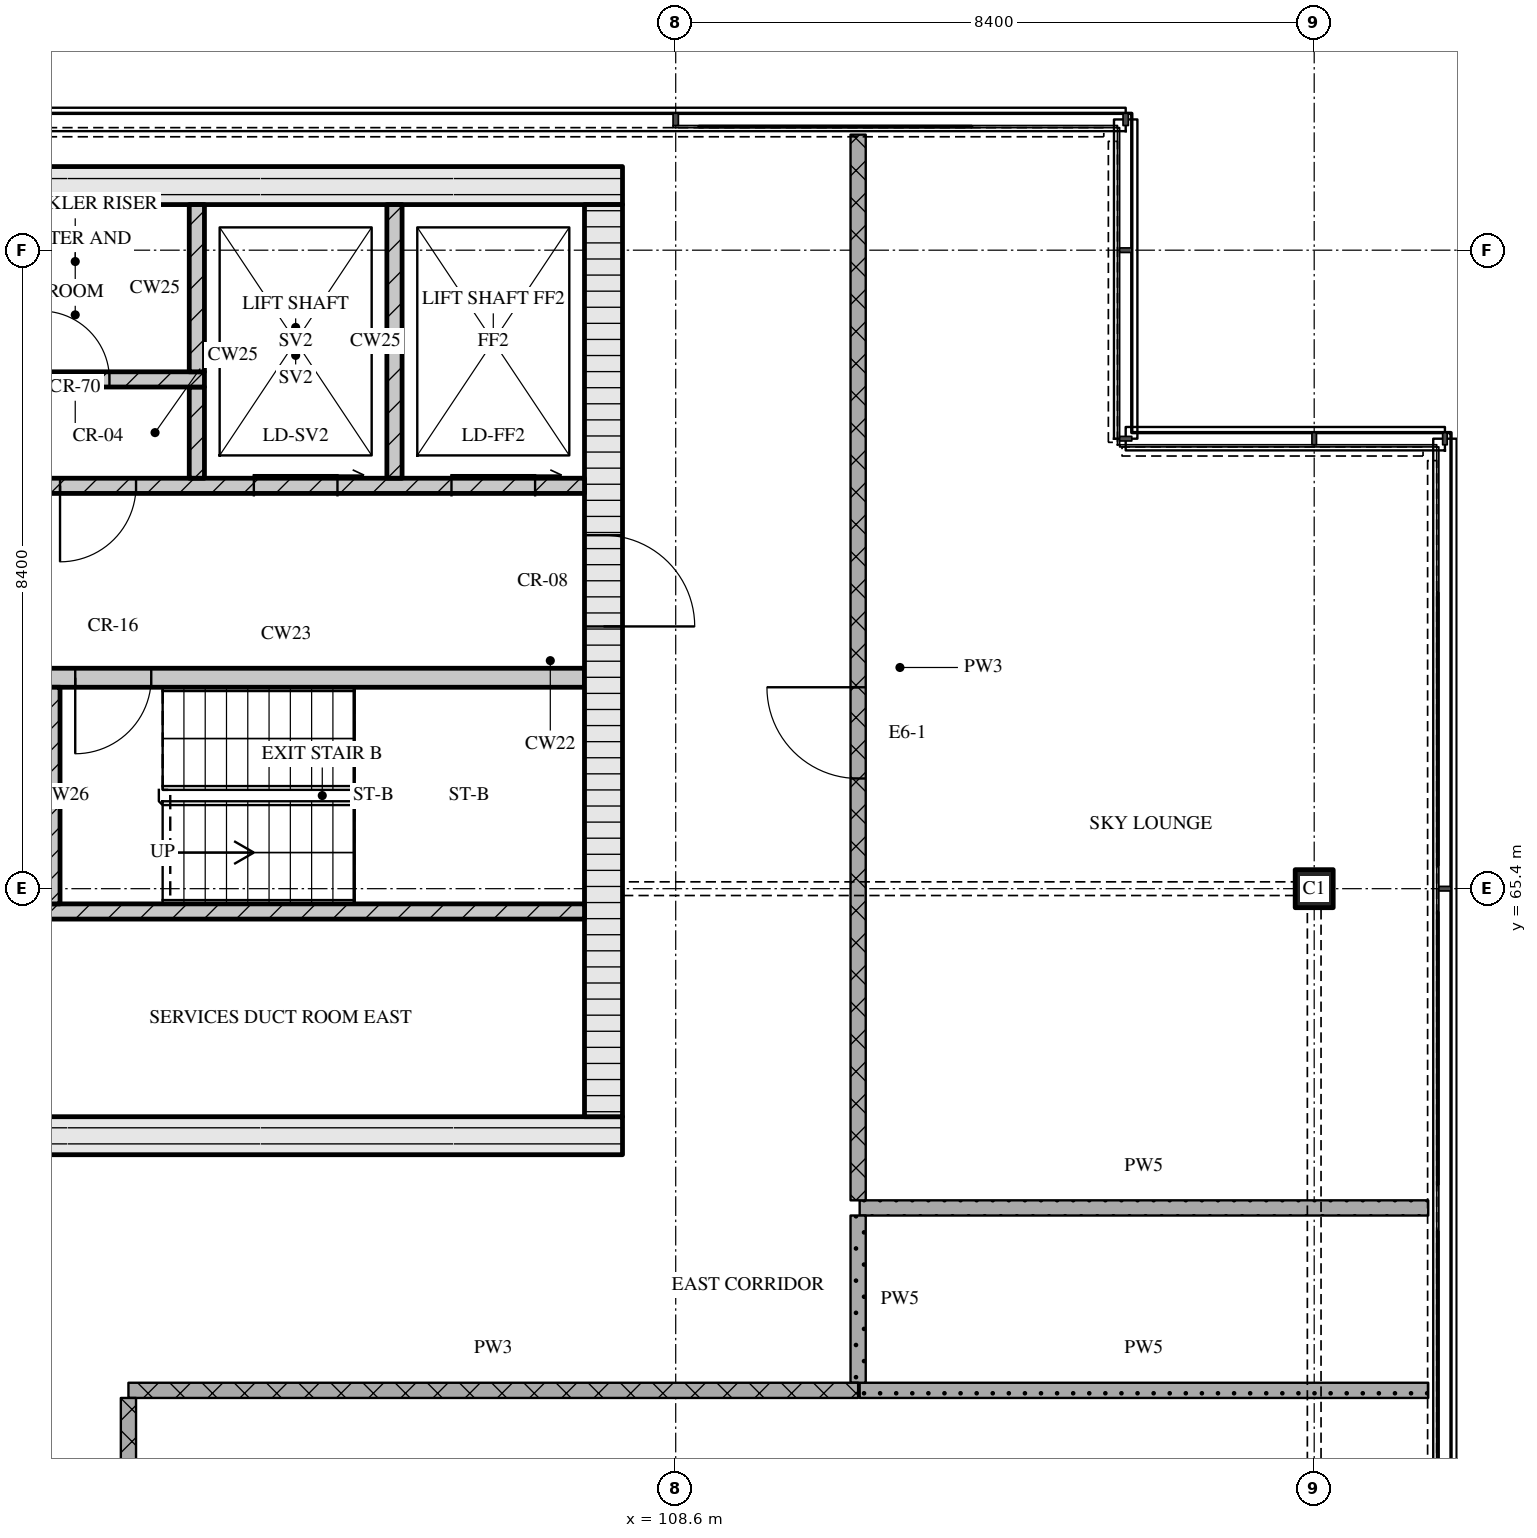
"""IFC4 building model, lengths in metres.
Left out: names, types, materials, properties, quantities, classifications, styles, units other than length and angle.
Written with IfcOpenShell. Run it as: python <this file> out.ifc"""

import sys

from ifc_helpers import new_model, si_unit, direction, frame, frame_2d, origin, origin_2d, place, context, subcontext, project, spatial, rectangle, extrude, element, fill, save


model = new_model("IFC4")
c1 = context("Model", 3, precision=1e-05, world=origin(), true_north=direction((0.0, 1.0)))
c2 = subcontext(c1, "Body", "Model", "MODEL_VIEW")
j1 = project(units=[si_unit("LENGTHUNIT", "METRE"), si_unit("PLANEANGLEUNIT", "RADIAN")], contexts=[c1])
p1 = place(None, origin())
s1 = spatial("IfcSite", under=j1, at=p1, CompositionType="ELEMENT")
p2 = place(p1, origin())
s2 = spatial("IfcBuilding", under=s1, at=p2, CompositionType="ELEMENT")
p3 = place(p2, frame((0.0, 0.0, 299.55)))
s3 = spatial("IfcBuildingStorey", under=s2, at=p3, CompositionType="ELEMENT", Elevation=299.55)
p4 = place(p3, frame((117.0, 65.4, 0.0), z_axis=(0.0, 0.0, 1.0), x_axis=(1.0, 0.0, 0.0)))
e1 = element("IfcColumn", 1, at=p4, inside=s3, PredefinedType="COLUMN", context=c2, shape_type="SweptSolid", body=[
    extrude(rectangle(XDim=0.5, YDim=0.5, at=origin_2d()), origin(), (0.0, 0.0, 1.0), 3.6),
])
p5 = place(p3, frame((67.3, 62.15, 0.0), z_axis=(0.0, 0.0, 1.0), x_axis=(1.0, 0.0, 0.0)))
e2 = element("IfcWall", 2, at=p5, inside=s3, PredefinedType="SOLIDWALL", context=c2, shape_type="SweptSolid", body=[
    extrude(rectangle(XDim=40.6, YDim=0.5, at=frame_2d((20.3, 0.0))), origin(), (0.0, 0.0, 1.0), 3.32),
])
p6 = place(p5, frame((20.65, 0.0, 0.0)))
e3 = element("IfcOpeningElement", 3, at=p6, cuts=e2, PredefinedType="OPENING", context=c2, shape_type="SweptSolid", body=[
    extrude(rectangle(XDim=1.8, YDim=2.1, at=frame_2d((0.9, 1.05))), frame((0.0, 0.26, 0.0), z_axis=(0.0, -1.0, 0.0), x_axis=(1.0, 0.0, 0.0)), (0.0, 0.0, 1.0), 0.52),
])
p7 = place(p3, frame((67.3, 74.65, 0.0), z_axis=(0.0, 0.0, 1.0), x_axis=(1.0, 0.0, 0.0)))
e4 = element("IfcWall", 4, at=p7, inside=s3, PredefinedType="SOLIDWALL", context=c2, shape_type="SweptSolid", body=[
    extrude(rectangle(XDim=40.6, YDim=0.5, at=frame_2d((20.3, 0.0))), origin(), (0.0, 0.0, 1.0), 3.32),
])
p8 = place(p3, frame((107.65, 62.4, 0.0), z_axis=(0.0, 0.0, 1.0), x_axis=(0.0, 1.0, 0.0)))
e5 = element("IfcWall", 5, at=p8, inside=s3, PredefinedType="SOLIDWALL", context=c2, shape_type="SweptSolid", body=[
    extrude(rectangle(XDim=12.0, YDim=0.5, at=frame_2d((6.0, 0.0))), origin(), (0.0, 0.0, 1.0), 3.32),
])
p9 = place(p8, frame((6.45, 0.0, 0.0)))
e6 = element("IfcOpeningElement", 6, at=p9, cuts=e5, PredefinedType="OPENING", context=c2, shape_type="SweptSolid", body=[
    extrude(rectangle(XDim=1.2, YDim=2.1, at=frame_2d((0.6, 1.05))), frame((0.0, 0.26, 0.0), z_axis=(0.0, -1.0, 0.0), x_axis=(1.0, 0.0, 0.0)), (0.0, 0.0, 1.0), 0.52),
])
p10 = place(p3, frame((91.4, 65.1, 0.0), z_axis=(0.0, 0.0, 1.0), x_axis=(1.0, 0.0, 0.0)))
e7 = element("IfcWall", 7, at=p10, inside=s3, PredefinedType="SOLIDWALL", context=c2, shape_type="SweptSolid", body=[
    extrude(rectangle(XDim=16.0, YDim=0.2, at=frame_2d((8.0, 0.0))), origin(), (0.0, 0.0, 1.0), 3.32),
])
p11 = place(p10, frame((0.85, 0.0, 0.0)))
e8 = element("IfcOpeningElement", 8, at=p11, cuts=e7, PredefinedType="OPENING", context=c2, shape_type="SweptSolid", body=[
    extrude(rectangle(XDim=1.1, YDim=2.1, at=frame_2d((0.55, 1.05))), frame((0.0, 0.11, 0.0), z_axis=(0.0, -1.0, 0.0), x_axis=(1.0, 0.0, 0.0)), (0.0, 0.0, 1.0), 0.22),
])
p12 = place(p10, frame((3.35, 0.0, 0.0)))
e9 = element("IfcOpeningElement", 9, at=p12, cuts=e7, PredefinedType="OPENING", context=c2, shape_type="SweptSolid", body=[
    extrude(rectangle(XDim=1.1, YDim=2.1, at=frame_2d((0.55, 1.05))), frame((0.0, 0.11, 0.0), z_axis=(0.0, -1.0, 0.0), x_axis=(1.0, 0.0, 0.0)), (0.0, 0.0, 1.0), 0.22),
])
p13 = place(p10, frame((5.85, 0.0, 0.0)))
e10 = element("IfcOpeningElement", 10, at=p13, cuts=e7, PredefinedType="OPENING", context=c2, shape_type="SweptSolid", body=[
    extrude(rectangle(XDim=1.1, YDim=2.1, at=frame_2d((0.55, 1.05))), frame((0.0, 0.11, 0.0), z_axis=(0.0, -1.0, 0.0), x_axis=(1.0, 0.0, 0.0)), (0.0, 0.0, 1.0), 0.22),
])
p14 = place(p10, frame((7.83, 0.0, 0.0)))
e11 = element("IfcOpeningElement", 11, at=p14, cuts=e7, PredefinedType="OPENING", context=c2, shape_type="SweptSolid", body=[
    extrude(rectangle(XDim=0.9, YDim=2.1, at=frame_2d((0.45, 1.05))), frame((0.0, 0.11, 0.0), z_axis=(0.0, -1.0, 0.0), x_axis=(1.0, 0.0, 0.0)), (0.0, 0.0, 1.0), 0.22),
])
p15 = place(p3, frame((100.35, 65.2, 0.0), z_axis=(0.0, 0.0, 1.0), x_axis=(0.0, 1.0, 0.0)))
e12 = element("IfcWall", 12, at=p15, inside=s3, PredefinedType="SOLIDWALL", context=c2, shape_type="SweptSolid", body=[
    extrude(rectangle(XDim=2.85, YDim=0.3, at=frame_2d((1.425, 0.0))), origin(), (0.0, 0.0, 1.0), 3.32),
])
p16 = place(p3, frame((98.95, 68.175, 0.0), z_axis=(0.0, 0.0, 1.0), x_axis=(1.0, 0.0, 0.0)))
e13 = element("IfcWall", 13, at=p16, inside=s3, PredefinedType="SOLIDWALL", context=c2, shape_type="SweptSolid", body=[
    extrude(rectangle(XDim=8.45, YDim=0.25, at=frame_2d((4.225, 0.0))), origin(), (0.0, 0.0, 1.0), 3.32),
])
p17 = place(p16, frame((0.45, 0.0, 0.0)))
e14 = element("IfcOpeningElement", 14, at=p17, cuts=e13, PredefinedType="OPENING", context=c2, shape_type="SweptSolid", body=[
    extrude(rectangle(XDim=0.8, YDim=2.1, at=frame_2d((0.4, 1.05))), frame((0.0, 0.135, 0.0), z_axis=(0.0, -1.0, 0.0), x_axis=(1.0, 0.0, 0.0)), (0.0, 0.0, 1.0), 0.27),
])
p18 = place(p16, frame((1.75, 0.0, 0.0)))
e15 = element("IfcOpeningElement", 15, at=p18, cuts=e13, PredefinedType="OPENING", context=c2, shape_type="SweptSolid", body=[
    extrude(rectangle(XDim=1.0, YDim=2.1, at=frame_2d((0.5, 1.05))), frame((0.0, 0.135, 0.0), z_axis=(0.0, -1.0, 0.0), x_axis=(1.0, 0.0, 0.0)), (0.0, 0.0, 1.0), 0.27),
])
p19 = place(p3, frame((67.8, 70.7, 0.0), z_axis=(0.0, 0.0, 1.0), x_axis=(1.0, 0.0, 0.0)))
e16 = element("IfcWall", 16, at=p19, inside=s3, PredefinedType="SOLIDWALL", context=c2, shape_type="SweptSolid", body=[
    extrude(rectangle(XDim=39.6, YDim=0.2, at=frame_2d((19.8, 0.0))), origin(), (0.0, 0.0, 1.0), 3.32),
])
p20 = place(p19, frame((0.65, 0.0, 0.0)))
e17 = element("IfcOpeningElement", 17, at=p20, cuts=e16, PredefinedType="OPENING", context=c2, shape_type="SweptSolid", body=[
    extrude(rectangle(XDim=1.1, YDim=2.1, at=frame_2d((0.55, 1.05))), frame((0.0, 0.11, 0.0), z_axis=(0.0, -1.0, 0.0), x_axis=(1.0, 0.0, 0.0)), (0.0, 0.0, 1.0), 0.22),
])
p21 = place(p19, frame((3.25, 0.0, 0.0)))
e18 = element("IfcOpeningElement", 18, at=p21, cuts=e16, PredefinedType="OPENING", context=c2, shape_type="SweptSolid", body=[
    extrude(rectangle(XDim=1.1, YDim=2.1, at=frame_2d((0.55, 1.05))), frame((0.0, 0.11, 0.0), z_axis=(0.0, -1.0, 0.0), x_axis=(1.0, 0.0, 0.0)), (0.0, 0.0, 1.0), 0.22),
])
p22 = place(p19, frame((5.9, 0.0, 0.0)))
e19 = element("IfcOpeningElement", 19, at=p22, cuts=e16, PredefinedType="OPENING", context=c2, shape_type="SweptSolid", body=[
    extrude(rectangle(XDim=1.0, YDim=2.1, at=frame_2d((0.5, 1.05))), frame((0.0, 0.11, 0.0), z_axis=(0.0, -1.0, 0.0), x_axis=(1.0, 0.0, 0.0)), (0.0, 0.0, 1.0), 0.22),
])
p23 = place(p19, frame((21.7, 0.0, 0.0)))
e20 = element("IfcOpeningElement", 20, at=p23, cuts=e16, PredefinedType="OPENING", context=c2, shape_type="SweptSolid", body=[
    extrude(rectangle(XDim=1.0, YDim=2.1, at=frame_2d((0.5, 1.05))), frame((0.0, 0.11, 0.0), z_axis=(0.0, -1.0, 0.0), x_axis=(1.0, 0.0, 0.0)), (0.0, 0.0, 1.0), 0.22),
])
p24 = place(p19, frame((32.7, 0.0, 0.0)))
e21 = element("IfcOpeningElement", 21, at=p24, cuts=e16, PredefinedType="OPENING", context=c2, shape_type="SweptSolid", body=[
    extrude(rectangle(XDim=1.0, YDim=2.1, at=frame_2d((0.5, 1.05))), frame((0.0, 0.11, 0.0), z_axis=(0.0, -1.0, 0.0), x_axis=(1.0, 0.0, 0.0)), (0.0, 0.0, 1.0), 0.22),
])
p25 = place(p19, frame((35.25, 0.0, 0.0)))
e22 = element("IfcOpeningElement", 22, at=p25, cuts=e16, PredefinedType="OPENING", context=c2, shape_type="SweptSolid", body=[
    extrude(rectangle(XDim=1.1, YDim=2.1, at=frame_2d((0.55, 1.05))), frame((0.0, 0.11, 0.0), z_axis=(0.0, -1.0, 0.0), x_axis=(1.0, 0.0, 0.0)), (0.0, 0.0, 1.0), 0.22),
])
p26 = place(p19, frame((37.85, 0.0, 0.0)))
e23 = element("IfcOpeningElement", 23, at=p26, cuts=e16, PredefinedType="OPENING", context=c2, shape_type="SweptSolid", body=[
    extrude(rectangle(XDim=1.1, YDim=2.1, at=frame_2d((0.55, 1.05))), frame((0.0, 0.11, 0.0), z_axis=(0.0, -1.0, 0.0), x_axis=(1.0, 0.0, 0.0)), (0.0, 0.0, 1.0), 0.22),
])
p27 = place(p3, frame((102.3, 70.8, 0.0), z_axis=(0.0, 0.0, 1.0), x_axis=(0.0, 1.0, 0.0)))
e24 = element("IfcWall", 24, at=p27, inside=s3, PredefinedType="SOLIDWALL", context=c2, shape_type="SweptSolid", body=[
    extrude(rectangle(XDim=1.2, YDim=0.2, at=frame_2d((0.6, 0.0))), origin(), (0.0, 0.0, 1.0), 3.32),
])
p28 = place(p3, frame((104.9, 70.8, 0.0), z_axis=(0.0, 0.0, 1.0), x_axis=(0.0, 1.0, 0.0)))
e25 = element("IfcWall", 25, at=p28, inside=s3, PredefinedType="SOLIDWALL", context=c2, shape_type="SweptSolid", body=[
    extrude(rectangle(XDim=3.6, YDim=0.2, at=frame_2d((1.8, 0.0))), origin(), (0.0, 0.0, 1.0), 3.32),
])
p29 = place(p3, frame((93.28, 72.1, 0.0), z_axis=(0.0, 0.0, 1.0), x_axis=(1.0, 0.0, 0.0)))
e26 = element("IfcWall", 26, at=p29, inside=s3, PredefinedType="SOLIDWALL", context=c2, shape_type="SweptSolid", body=[
    extrude(rectangle(XDim=9.12, YDim=0.2, at=frame_2d((4.56, 0.0))), origin(), (0.0, 0.0, 1.0), 3.32),
])
p30 = place(p29, frame((0.87, 0.0, 0.0)))
e27 = element("IfcOpeningElement", 27, at=p30, cuts=e26, PredefinedType="OPENING", context=c2, shape_type="SweptSolid", body=[
    extrude(rectangle(XDim=0.9, YDim=2.1, at=frame_2d((0.45, 1.05))), frame((0.0, 0.11, 0.0), z_axis=(0.0, -1.0, 0.0), x_axis=(1.0, 0.0, 0.0)), (0.0, 0.0, 1.0), 0.22),
])
p31 = place(p29, frame((3.73, 0.0, 0.0)))
e28 = element("IfcOpeningElement", 28, at=p31, cuts=e26, PredefinedType="OPENING", context=c2, shape_type="SweptSolid", body=[
    extrude(rectangle(XDim=0.9, YDim=2.1, at=frame_2d((0.45, 1.05))), frame((0.0, 0.11, 0.0), z_axis=(0.0, -1.0, 0.0), x_axis=(1.0, 0.0, 0.0)), (0.0, 0.0, 1.0), 0.22),
])
p32 = place(p29, frame((6.97, 0.0, 0.0)))
e29 = element("IfcOpeningElement", 29, at=p32, cuts=e26, PredefinedType="OPENING", context=c2, shape_type="SweptSolid", body=[
    extrude(rectangle(XDim=0.9, YDim=2.1, at=frame_2d((0.45, 1.05))), frame((0.0, 0.11, 0.0), z_axis=(0.0, -1.0, 0.0), x_axis=(1.0, 0.0, 0.0)), (0.0, 0.0, 1.0), 0.22),
])
p33 = place(p3, frame((102.3, 72.2, 0.0), z_axis=(0.0, 0.0, 1.0), x_axis=(0.0, 1.0, 0.0)))
e30 = element("IfcWall", 30, at=p33, inside=s3, PredefinedType="SOLIDWALL", context=c2, shape_type="SweptSolid", body=[
    extrude(rectangle(XDim=2.2, YDim=0.2, at=frame_2d((1.1, 0.0))), origin(), (0.0, 0.0, 1.0), 3.32),
])
p34 = place(p3, frame((101.4, 58.8, 0.0), z_axis=(0.0, 0.0, 1.0), x_axis=(1.0, 0.0, 0.0)))
e31 = element("IfcWall", 31, at=p34, inside=s3, PredefinedType="PARTITIONING", context=c2, shape_type="SweptSolid", body=[
    extrude(rectangle(XDim=9.6, YDim=0.2, at=frame_2d((4.8, 0.0))), origin(), (0.0, 0.0, 1.0), 3.32),
])
for number, where, z_axis, x_axis in (
    (32, (111.02, 58.8, 0.0), (0.0, 0.0, 1.0), (1.0, 0.0, 0.0)),
    (33, (111.02, 61.2, 0.0), (0.0, 0.0, 1.0), (1.0, 0.0, 0.0)),
):
    element("IfcWall", number, at=place(p3, frame(where, z_axis=z_axis, x_axis=x_axis)), inside=s3, PredefinedType="PARTITIONING", context=c2, shape_type="SweptSolid", body=[
        extrude(rectangle(XDim=7.48, YDim=0.2, at=frame_2d((3.74, 0.0))), origin(), (0.0, 0.0, 1.0), 3.32),
    ])
p35 = place(p3, frame((101.4, 58.7, 0.0), z_axis=(0.0, 0.0, 1.0), x_axis=(0.0, -1.0, 0.0)))
e34 = element("IfcWall", 34, at=p35, inside=s3, PredefinedType="PARTITIONING", context=c2, shape_type="SweptSolid", body=[
    extrude(rectangle(XDim=8.0, YDim=0.2, at=frame_2d((4.0, 0.0))), origin(), (0.0, 0.0, 1.0), 3.32),
])
p36 = place(p35, frame((2.45, 0.0, 0.0)))
e35 = element("IfcOpeningElement", 35, at=p36, cuts=e34, PredefinedType="OPENING", context=c2, shape_type="SweptSolid", body=[
    extrude(rectangle(XDim=1.2, YDim=2.1, at=frame_2d((0.6, 1.05))), frame((0.0, 0.11, 0.0), z_axis=(0.0, -1.0, 0.0), x_axis=(1.0, 0.0, 0.0)), (0.0, 0.0, 1.0), 0.22),
])
p37 = place(p3, frame((111.0, 75.32, 0.0), z_axis=(0.0, 0.0, 1.0), x_axis=(0.0, -1.0, 0.0)))
e36 = element("IfcWall", 36, at=p37, inside=s3, PredefinedType="PARTITIONING", context=c2, shape_type="SweptSolid", body=[
    extrude(rectangle(XDim=14.02, YDim=0.2, at=frame_2d((7.01, 0.0))), origin(), (0.0, 0.0, 1.0), 3.32),
])
p38 = place(p37, frame((7.27, 0.0, 0.0)))
e37 = element("IfcOpeningElement", 37, at=p38, cuts=e36, PredefinedType="OPENING", context=c2, shape_type="SweptSolid", body=[
    extrude(rectangle(XDim=1.2, YDim=2.1, at=frame_2d((0.6, 1.05))), frame((0.0, 0.11, 0.0), z_axis=(0.0, -1.0, 0.0), x_axis=(1.0, 0.0, 0.0)), (0.0, 0.0, 1.0), 0.22),
])
p39 = place(p3, frame((111.0, 61.1, 0.0), z_axis=(0.0, 0.0, 1.0), x_axis=(0.0, -1.0, 0.0)))
e38 = element("IfcWall", 38, at=p39, inside=s3, PredefinedType="PARTITIONING", context=c2, shape_type="SweptSolid", body=[
    extrude(rectangle(XDim=2.2, YDim=0.2, at=frame_2d((1.1, 0.0))), origin(), (0.0, 0.0, 1.0), 3.32),
])
p40 = place(p18, origin())
e39 = element("IfcDoor", 39, at=p40, inside=s3, OperationType="SINGLE_SWING_RIGHT", PredefinedType="DOOR", context=c2, shape_type="SweptSolid", body=[
    extrude(rectangle(XDim=1.0, YDim=2.1, at=frame_2d((0.5, 1.05))), frame((0.0, 0.025, 0.0), z_axis=(0.0, -1.0, 0.0), x_axis=(1.0, 0.0, 0.0)), (0.0, 0.0, 1.0), 0.05),
])
fill(e15, e39)
p41 = place(p9, origin())
e40 = element("IfcDoor", 40, at=p41, inside=s3, OperationType="SINGLE_SWING_RIGHT", PredefinedType="DOOR", context=c2, shape_type="SweptSolid", body=[
    extrude(rectangle(XDim=1.2, YDim=2.1, at=frame_2d((0.6, 1.05))), frame((0.0, 0.025, 0.0), z_axis=(0.0, -1.0, 0.0), x_axis=(1.0, 0.0, 0.0)), (0.0, 0.0, 1.0), 0.05),
])
fill(e6, e40)
p42 = place(p24, origin())
e41 = element("IfcDoor", 41, at=p42, inside=s3, OperationType="SINGLE_SWING_RIGHT", PredefinedType="DOOR", context=c2, shape_type="SweptSolid", body=[
    extrude(rectangle(XDim=1.0, YDim=2.1, at=frame_2d((0.5, 1.05))), frame((0.0, 0.025, 0.0), z_axis=(0.0, -1.0, 0.0), x_axis=(1.0, 0.0, 0.0)), (0.0, 0.0, 1.0), 0.05),
])
fill(e21, e41)
p43 = place(p25, origin())
e42 = element("IfcDoor", 42, at=p43, inside=s3, OperationType="SLIDING_TO_RIGHT", PredefinedType="DOOR", context=c2, shape_type="SweptSolid", body=[
    extrude(rectangle(XDim=1.1, YDim=2.1, at=frame_2d((0.55, 1.05))), frame((0.0, 0.025, 0.0), z_axis=(0.0, -1.0, 0.0), x_axis=(1.0, 0.0, 0.0)), (0.0, 0.0, 1.0), 0.05),
])
fill(e22, e42)
p44 = place(p26, origin())
e43 = element("IfcDoor", 43, at=p44, inside=s3, OperationType="SLIDING_TO_RIGHT", PredefinedType="DOOR", context=c2, shape_type="SweptSolid", body=[
    extrude(rectangle(XDim=1.1, YDim=2.1, at=frame_2d((0.55, 1.05))), frame((0.0, 0.025, 0.0), z_axis=(0.0, -1.0, 0.0), x_axis=(1.0, 0.0, 0.0)), (0.0, 0.0, 1.0), 0.05),
])
fill(e23, e43)
p45 = place(p32, origin())
e44 = element("IfcDoor", 44, at=p45, inside=s3, OperationType="SINGLE_SWING_LEFT", PredefinedType="DOOR", context=c2, shape_type="SweptSolid", body=[
    extrude(rectangle(XDim=0.9, YDim=2.1, at=frame_2d((0.45, 1.05))), frame((0.0, 0.025, 0.0), z_axis=(0.0, -1.0, 0.0), x_axis=(1.0, 0.0, 0.0)), (0.0, 0.0, 1.0), 0.05),
])
fill(e29, e44)
p46 = place(p38, origin())
e45 = element("IfcDoor", 45, at=p46, inside=s3, OperationType="SINGLE_SWING_RIGHT", PredefinedType="DOOR", context=c2, shape_type="SweptSolid", body=[
    extrude(rectangle(XDim=1.2, YDim=2.1, at=frame_2d((0.6, 1.05))), frame((0.0, 0.025, 0.0), z_axis=(0.0, -1.0, 0.0), x_axis=(1.0, 0.0, 0.0)), (0.0, 0.0, 1.0), 0.05),
])
fill(e37, e45)
save(model, sys.argv[1])
